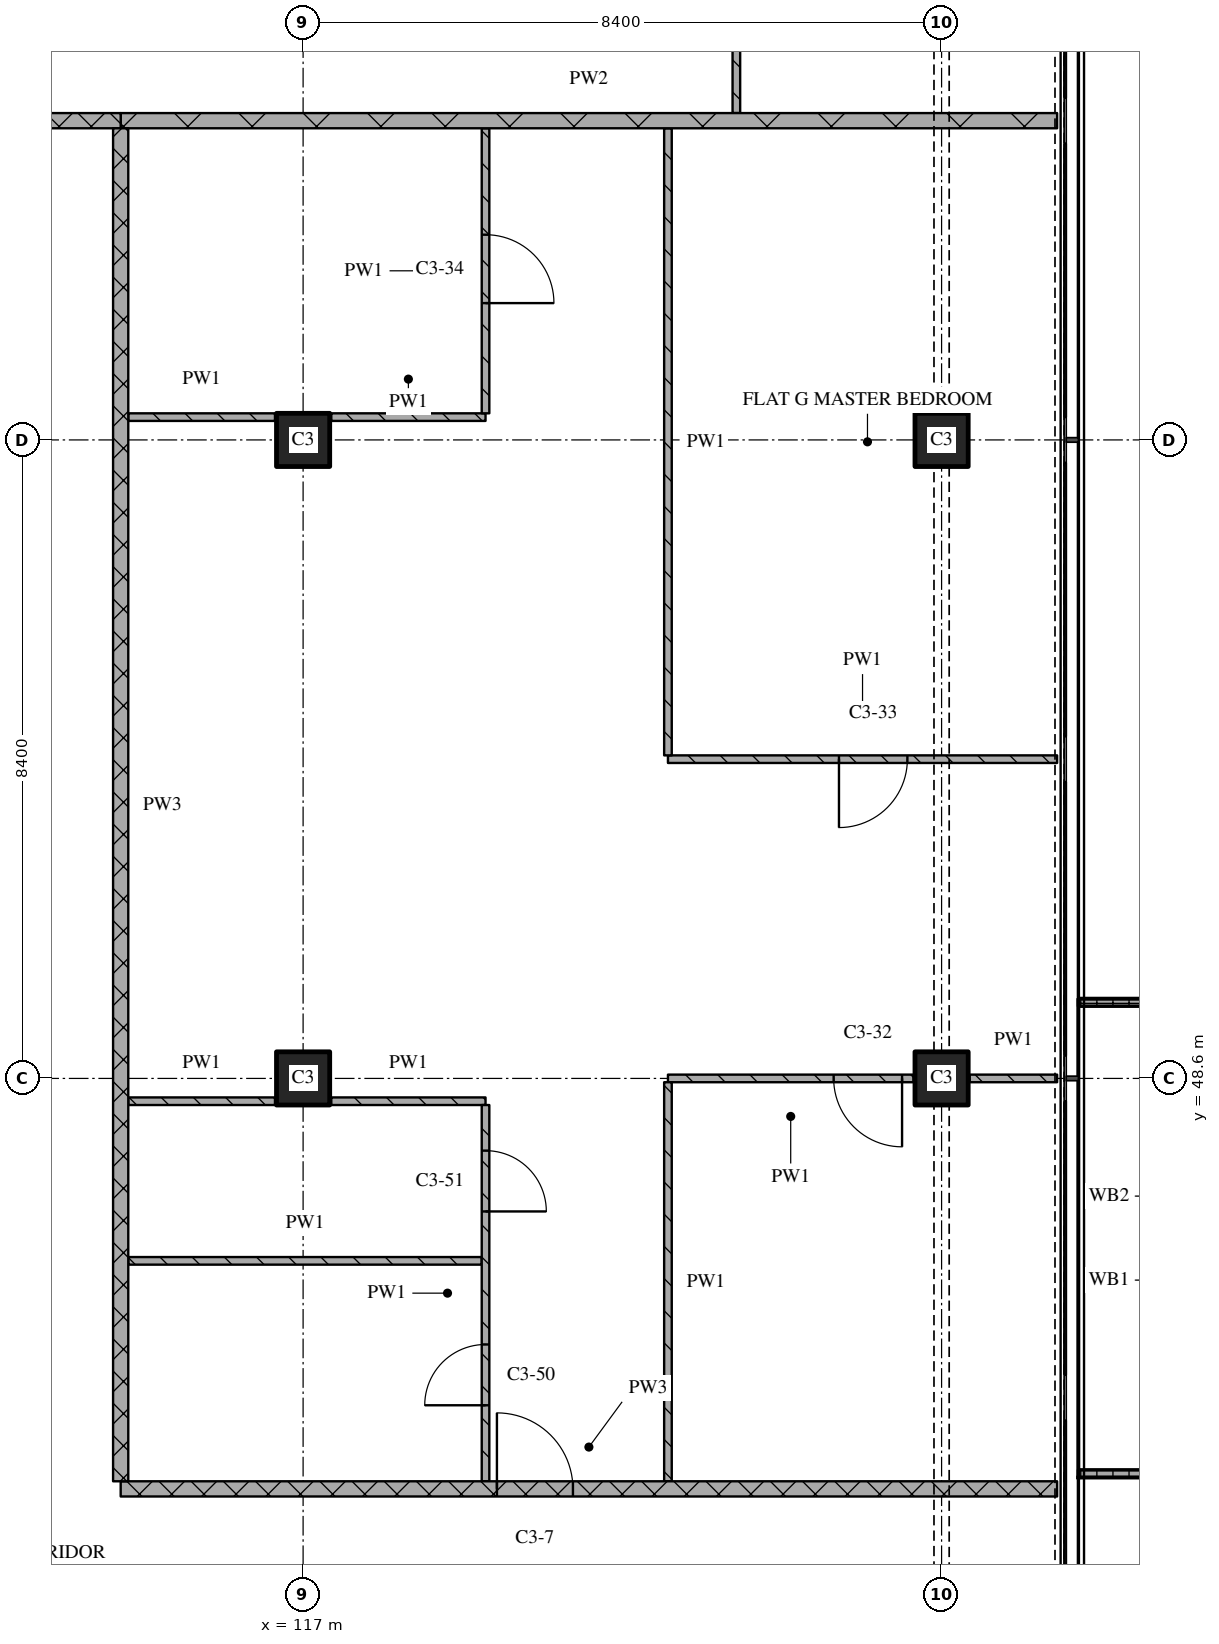
"""IFC4 building model, lengths in metres.
Left out: names, types, materials, properties, quantities, classifications, styles, units other than length and angle.
Written with IfcOpenShell. Run it as: python <this file> out.ifc"""

import sys

from ifc_helpers import new_model, si_unit, direction, frame, frame_2d, origin, origin_2d, place, context, subcontext, project, spatial, polyline, rectangle, outline, extrude, element, fill, save


model = new_model("IFC4")
c1 = context("Model", 3, precision=1e-05, world=origin(), true_north=direction((0.0, 1.0)))
c2 = subcontext(c1, "Body", "Model", "MODEL_VIEW")
j1 = project(units=[si_unit("LENGTHUNIT", "METRE"), si_unit("PLANEANGLEUNIT", "RADIAN")], contexts=[c1])
p1 = place(None, origin())
s1 = spatial("IfcSite", under=j1, at=p1, CompositionType="ELEMENT")
p2 = place(p1, origin())
s2 = spatial("IfcBuilding", under=s1, at=p2, CompositionType="ELEMENT")
p3 = place(p2, frame((0.0, 0.0, 176.25)))
s3 = spatial("IfcBuildingStorey", under=s2, at=p3, CompositionType="ELEMENT", Elevation=176.25)
for number, where, z_axis, x_axis in (
    (1, (117.0, 48.6, 0.0), (0.0, 0.0, 1.0), (1.0, 0.0, 0.0)),
    (2, (117.0, 57.0, 0.0), (0.0, 0.0, 1.0), (1.0, 0.0, 0.0)),
    (3, (125.4, 48.6, 0.0), (0.0, 0.0, 1.0), (1.0, 0.0, 0.0)),
    (4, (125.4, 57.0, 0.0), (0.0, 0.0, 1.0), (1.0, 0.0, 0.0)),
):
    element("IfcColumn", number, at=place(p3, frame(where, z_axis=z_axis, x_axis=x_axis)), inside=s3, PredefinedType="COLUMN", context=c2, shape_type="SweptSolid", body=[
        extrude(rectangle(XDim=0.7, YDim=0.7, at=origin_2d()), origin(), (0.0, 0.0, 1.0), 3.6),
    ])
p4 = place(p3, origin())
e5 = element("IfcWall", 5, at=p4, inside=s3, PredefinedType="SOLIDWALL", context=c2, shape_type="SweptSolid", body=[
    extrude(outline(polyline([(127.2, 43.35), (127.2, 43.45), (128.967, 43.45), (128.967, 49.55), (127.2, 49.55), (127.2, 49.65), (129.067, 49.65), (129.067, 43.35), (127.2, 43.35)])), origin(), (0.0, 0.0, 1.0), 1.0),
])
p5 = place(p3, frame((114.6, 43.2, 0.0), z_axis=(0.0, 0.0, 1.0), x_axis=(1.0, 0.0, 0.0)))
e6 = element("IfcWall", 6, at=p5, inside=s3, PredefinedType="PARTITIONING", context=c2, shape_type="SweptSolid", body=[
    extrude(rectangle(XDim=12.32, YDim=0.2, at=frame_2d((6.16, 0.0))), origin(), (0.0, 0.0, 1.0), 3.32),
])
p6 = place(p5, frame((4.95, 0.0, 0.0)))
e7 = element("IfcOpeningElement", 7, at=p6, cuts=e6, PredefinedType="OPENING", context=c2, shape_type="SweptSolid", body=[
    extrude(rectangle(XDim=1.0, YDim=2.1, at=frame_2d((0.5, 1.05))), frame((0.0, 0.11, 0.0), z_axis=(0.0, -1.0, 0.0), x_axis=(1.0, 0.0, 0.0)), (0.0, 0.0, 1.0), 0.22),
])
p7 = place(p3, frame((114.7, 46.2, 0.0), z_axis=(0.0, 0.0, 1.0), x_axis=(1.0, 0.0, 0.0)))
e8 = element("IfcWall", 8, at=p7, inside=s3, PredefinedType="PARTITIONING", context=c2, shape_type="SweptSolid", body=[
    extrude(rectangle(XDim=4.65, YDim=0.1, at=frame_2d((2.325, 0.0))), origin(), (0.0, 0.0, 1.0), 3.32),
])
p8 = place(p3, frame((114.7, 48.3, 0.0), z_axis=(0.0, 0.0, 1.0), x_axis=(1.0, 0.0, 0.0)))
e9 = element("IfcWall", 9, at=p8, inside=s3, PredefinedType="PARTITIONING", context=c2, shape_type="SweptSolid", body=[
    extrude(rectangle(XDim=1.93, YDim=0.1, at=frame_2d((0.965, 0.0))), origin(), (0.0, 0.0, 1.0), 3.32),
])
p9 = place(p3, frame((117.37, 48.3, 0.0), z_axis=(0.0, 0.0, 1.0), x_axis=(1.0, 0.0, 0.0)))
e10 = element("IfcWall", 10, at=p9, inside=s3, PredefinedType="PARTITIONING", context=c2, shape_type="SweptSolid", body=[
    extrude(rectangle(XDim=2.03, YDim=0.1, at=frame_2d((1.015, 0.0))), origin(), (0.0, 0.0, 1.0), 3.32),
])
p10 = place(p3, frame((125.03, 48.6, 0.0), z_axis=(0.0, 0.0, 1.0), x_axis=(-1.0, 0.0, 0.0)))
e11 = element("IfcWall", 11, at=p10, inside=s3, PredefinedType="PARTITIONING", context=c2, shape_type="SweptSolid", body=[
    extrude(rectangle(XDim=3.23, YDim=0.1, at=frame_2d((1.615, 0.0))), origin(), (0.0, 0.0, 1.0), 3.32),
])
p11 = place(p10, frame((0.15, 0.0, 0.0)))
e12 = element("IfcOpeningElement", 12, at=p11, cuts=e11, PredefinedType="OPENING", context=c2, shape_type="SweptSolid", body=[
    extrude(rectangle(XDim=0.9, YDim=2.1, at=frame_2d((0.45, 1.05))), frame((0.0, 0.06, 0.0), z_axis=(0.0, -1.0, 0.0), x_axis=(1.0, 0.0, 0.0)), (0.0, 0.0, 1.0), 0.12),
])
p12 = place(p3, frame((125.77, 48.6, 0.0), z_axis=(0.0, 0.0, 1.0), x_axis=(1.0, 0.0, 0.0)))
e13 = element("IfcWall", 13, at=p12, inside=s3, PredefinedType="PARTITIONING", context=c2, shape_type="SweptSolid", body=[
    extrude(rectangle(XDim=1.15, YDim=0.1, at=frame_2d((0.575, 0.0))), origin(), (0.0, 0.0, 1.0), 3.32),
])
p13 = place(p3, frame((121.8, 52.8, 0.0), z_axis=(0.0, 0.0, 1.0), x_axis=(1.0, 0.0, 0.0)))
e14 = element("IfcWall", 14, at=p13, inside=s3, PredefinedType="PARTITIONING", context=c2, shape_type="SweptSolid", body=[
    extrude(rectangle(XDim=5.12, YDim=0.1, at=frame_2d((2.56, 0.0))), origin(), (0.0, 0.0, 1.0), 3.32),
])
p14 = place(p13, frame((2.25, 0.0, 0.0)))
e15 = element("IfcOpeningElement", 15, at=p14, cuts=e14, PredefinedType="OPENING", context=c2, shape_type="SweptSolid", body=[
    extrude(rectangle(XDim=0.9, YDim=2.1, at=frame_2d((0.45, 1.05))), frame((0.0, 0.06, 0.0), z_axis=(0.0, -1.0, 0.0), x_axis=(1.0, 0.0, 0.0)), (0.0, 0.0, 1.0), 0.12),
])
p15 = place(p3, frame((114.7, 57.3, 0.0), z_axis=(0.0, 0.0, 1.0), x_axis=(1.0, 0.0, 0.0)))
e16 = element("IfcWall", 16, at=p15, inside=s3, PredefinedType="PARTITIONING", context=c2, shape_type="SweptSolid", body=[
    extrude(rectangle(XDim=1.93, YDim=0.1, at=frame_2d((0.965, 0.0))), origin(), (0.0, 0.0, 1.0), 3.32),
])
p16 = place(p3, frame((117.37, 57.3, 0.0), z_axis=(0.0, 0.0, 1.0), x_axis=(1.0, 0.0, 0.0)))
e17 = element("IfcWall", 17, at=p16, inside=s3, PredefinedType="PARTITIONING", context=c2, shape_type="SweptSolid", body=[
    extrude(rectangle(XDim=2.03, YDim=0.1, at=frame_2d((1.015, 0.0))), origin(), (0.0, 0.0, 1.0), 3.32),
])
p17 = place(p3, frame((111.0, 61.2, 0.0), z_axis=(0.0, 0.0, 1.0), x_axis=(1.0, 0.0, 0.0)))
e18 = element("IfcWall", 18, at=p17, inside=s3, PredefinedType="PARTITIONING", context=c2, shape_type="SweptSolid", body=[
    extrude(rectangle(XDim=3.6, YDim=0.2, at=frame_2d((1.8, 0.0))), origin(), (0.0, 0.0, 1.0), 3.32),
])
p18 = place(p3, frame((114.6, 61.2, 0.0), z_axis=(0.0, 0.0, 1.0), x_axis=(1.0, 0.0, 0.0)))
e19 = element("IfcWall", 19, at=p18, inside=s3, PredefinedType="PARTITIONING", context=c2, shape_type="SweptSolid", body=[
    extrude(rectangle(XDim=12.32, YDim=0.2, at=frame_2d((6.16, 0.0))), origin(), (0.0, 0.0, 1.0), 3.32),
])
p19 = place(p3, frame((114.6, 61.1, 0.0), z_axis=(0.0, 0.0, 1.0), x_axis=(0.0, -1.0, 0.0)))
e20 = element("IfcWall", 20, at=p19, inside=s3, PredefinedType="PARTITIONING", context=c2, shape_type="SweptSolid", body=[
    extrude(rectangle(XDim=17.8, YDim=0.2, at=frame_2d((8.9, 0.0))), origin(), (0.0, 0.0, 1.0), 3.32),
])
p20 = place(p3, frame((119.4, 43.3, 0.0), z_axis=(0.0, 0.0, 1.0), x_axis=(0.0, 1.0, 0.0)))
e21 = element("IfcWall", 21, at=p20, inside=s3, PredefinedType="PARTITIONING", context=c2, shape_type="SweptSolid", body=[
    extrude(rectangle(XDim=4.95, YDim=0.1, at=frame_2d((2.475, 0.0))), origin(), (0.0, 0.0, 1.0), 3.32),
])
p21 = place(p20, frame((1.0, 0.0, 0.0)))
e22 = element("IfcOpeningElement", 22, at=p21, cuts=e21, PredefinedType="OPENING", context=c2, shape_type="SweptSolid", body=[
    extrude(rectangle(XDim=0.8, YDim=2.1, at=frame_2d((0.4, 1.05))), frame((0.0, 0.06, 0.0), z_axis=(0.0, -1.0, 0.0), x_axis=(1.0, 0.0, 0.0)), (0.0, 0.0, 1.0), 0.12),
])
p22 = place(p20, frame((3.55, 0.0, 0.0)))
e23 = element("IfcOpeningElement", 23, at=p22, cuts=e21, PredefinedType="OPENING", context=c2, shape_type="SweptSolid", body=[
    extrude(rectangle(XDim=0.8, YDim=2.1, at=frame_2d((0.4, 1.05))), frame((0.0, 0.06, 0.0), z_axis=(0.0, -1.0, 0.0), x_axis=(1.0, 0.0, 0.0)), (0.0, 0.0, 1.0), 0.12),
])
p23 = place(p3, frame((119.4, 57.35, 0.0), z_axis=(0.0, 0.0, 1.0), x_axis=(0.0, 1.0, 0.0)))
e24 = element("IfcWall", 24, at=p23, inside=s3, PredefinedType="PARTITIONING", context=c2, shape_type="SweptSolid", body=[
    extrude(rectangle(XDim=3.75, YDim=0.1, at=frame_2d((1.875, 0.0))), origin(), (0.0, 0.0, 1.0), 3.32),
])
p24 = place(p23, frame((1.45, 0.0, 0.0)))
e25 = element("IfcOpeningElement", 25, at=p24, cuts=e24, PredefinedType="OPENING", context=c2, shape_type="SweptSolid", body=[
    extrude(rectangle(XDim=0.9, YDim=2.1, at=frame_2d((0.45, 1.05))), frame((0.0, 0.06, 0.0), z_axis=(0.0, -1.0, 0.0), x_axis=(1.0, 0.0, 0.0)), (0.0, 0.0, 1.0), 0.12),
])
p25 = place(p3, frame((121.8, 48.55, 0.0), z_axis=(0.0, 0.0, 1.0), x_axis=(0.0, -1.0, 0.0)))
e26 = element("IfcWall", 26, at=p25, inside=s3, PredefinedType="PARTITIONING", context=c2, shape_type="SweptSolid", body=[
    extrude(rectangle(XDim=5.25, YDim=0.1, at=frame_2d((2.625, 0.0))), origin(), (0.0, 0.0, 1.0), 3.32),
])
for number, where, z_axis, x_axis in (
    (27, (121.8, 61.1, 0.0), (0.0, 0.0, 1.0), (0.0, -1.0, 0.0)),
    (28, (122.7, 69.55, 0.0), (0.0, 0.0, 1.0), (0.0, -1.0, 0.0)),
):
    element("IfcWall", number, at=place(p3, frame(where, z_axis=z_axis, x_axis=x_axis)), inside=s3, PredefinedType="PARTITIONING", context=c2, shape_type="SweptSolid", body=[
        extrude(rectangle(XDim=8.25, YDim=0.1, at=frame_2d((4.125, 0.0))), origin(), (0.0, 0.0, 1.0), 3.32),
    ])
p26 = place(p6, origin())
e29 = element("IfcDoor", 29, at=p26, inside=s3, OperationType="SINGLE_SWING_LEFT", PredefinedType="DOOR", context=c2, shape_type="SweptSolid", body=[
    extrude(rectangle(XDim=1.0, YDim=2.1, at=frame_2d((0.5, 1.05))), frame((0.0, 0.025, 0.0), z_axis=(0.0, -1.0, 0.0), x_axis=(1.0, 0.0, 0.0)), (0.0, 0.0, 1.0), 0.05),
])
fill(e7, e29)
p27 = place(p11, origin())
e30 = element("IfcDoor", 30, at=p27, inside=s3, OperationType="SINGLE_SWING_LEFT", PredefinedType="DOOR", context=c2, shape_type="SweptSolid", body=[
    extrude(rectangle(XDim=0.9, YDim=2.1, at=frame_2d((0.45, 1.05))), frame((0.0, 0.025, 0.0), z_axis=(0.0, -1.0, 0.0), x_axis=(1.0, 0.0, 0.0)), (0.0, 0.0, 1.0), 0.05),
])
fill(e12, e30)
p28 = place(p14, origin())
e31 = element("IfcDoor", 31, at=p28, inside=s3, OperationType="SINGLE_SWING_RIGHT", PredefinedType="DOOR", context=c2, shape_type="SweptSolid", body=[
    extrude(rectangle(XDim=0.9, YDim=2.1, at=frame_2d((0.45, 1.05))), frame((0.0, 0.025, 0.0), z_axis=(0.0, -1.0, 0.0), x_axis=(1.0, 0.0, 0.0)), (0.0, 0.0, 1.0), 0.05),
])
fill(e15, e31)
p29 = place(p21, origin())
e32 = element("IfcDoor", 32, at=p29, inside=s3, OperationType="SINGLE_SWING_LEFT", PredefinedType="DOOR", context=c2, shape_type="SweptSolid", body=[
    extrude(rectangle(XDim=0.8, YDim=2.1, at=frame_2d((0.4, 1.05))), frame((0.0, 0.025, 0.0), z_axis=(0.0, -1.0, 0.0), x_axis=(1.0, 0.0, 0.0)), (0.0, 0.0, 1.0), 0.05),
])
fill(e22, e32)
p30 = place(p22, origin())
e33 = element("IfcDoor", 33, at=p30, inside=s3, OperationType="SINGLE_SWING_RIGHT", PredefinedType="DOOR", context=c2, shape_type="SweptSolid", body=[
    extrude(rectangle(XDim=0.8, YDim=2.1, at=frame_2d((0.4, 1.05))), frame((0.0, 0.025, 0.0), z_axis=(0.0, -1.0, 0.0), x_axis=(1.0, 0.0, 0.0)), (0.0, 0.0, 1.0), 0.05),
])
fill(e23, e33)
p31 = place(p24, origin())
e34 = element("IfcDoor", 34, at=p31, inside=s3, OperationType="SINGLE_SWING_RIGHT", PredefinedType="DOOR", context=c2, shape_type="SweptSolid", body=[
    extrude(rectangle(XDim=0.9, YDim=2.1, at=frame_2d((0.45, 1.05))), frame((0.0, 0.025, 0.0), z_axis=(0.0, -1.0, 0.0), x_axis=(1.0, 0.0, 0.0)), (0.0, 0.0, 1.0), 0.05),
])
fill(e25, e34)
save(model, sys.argv[1])
